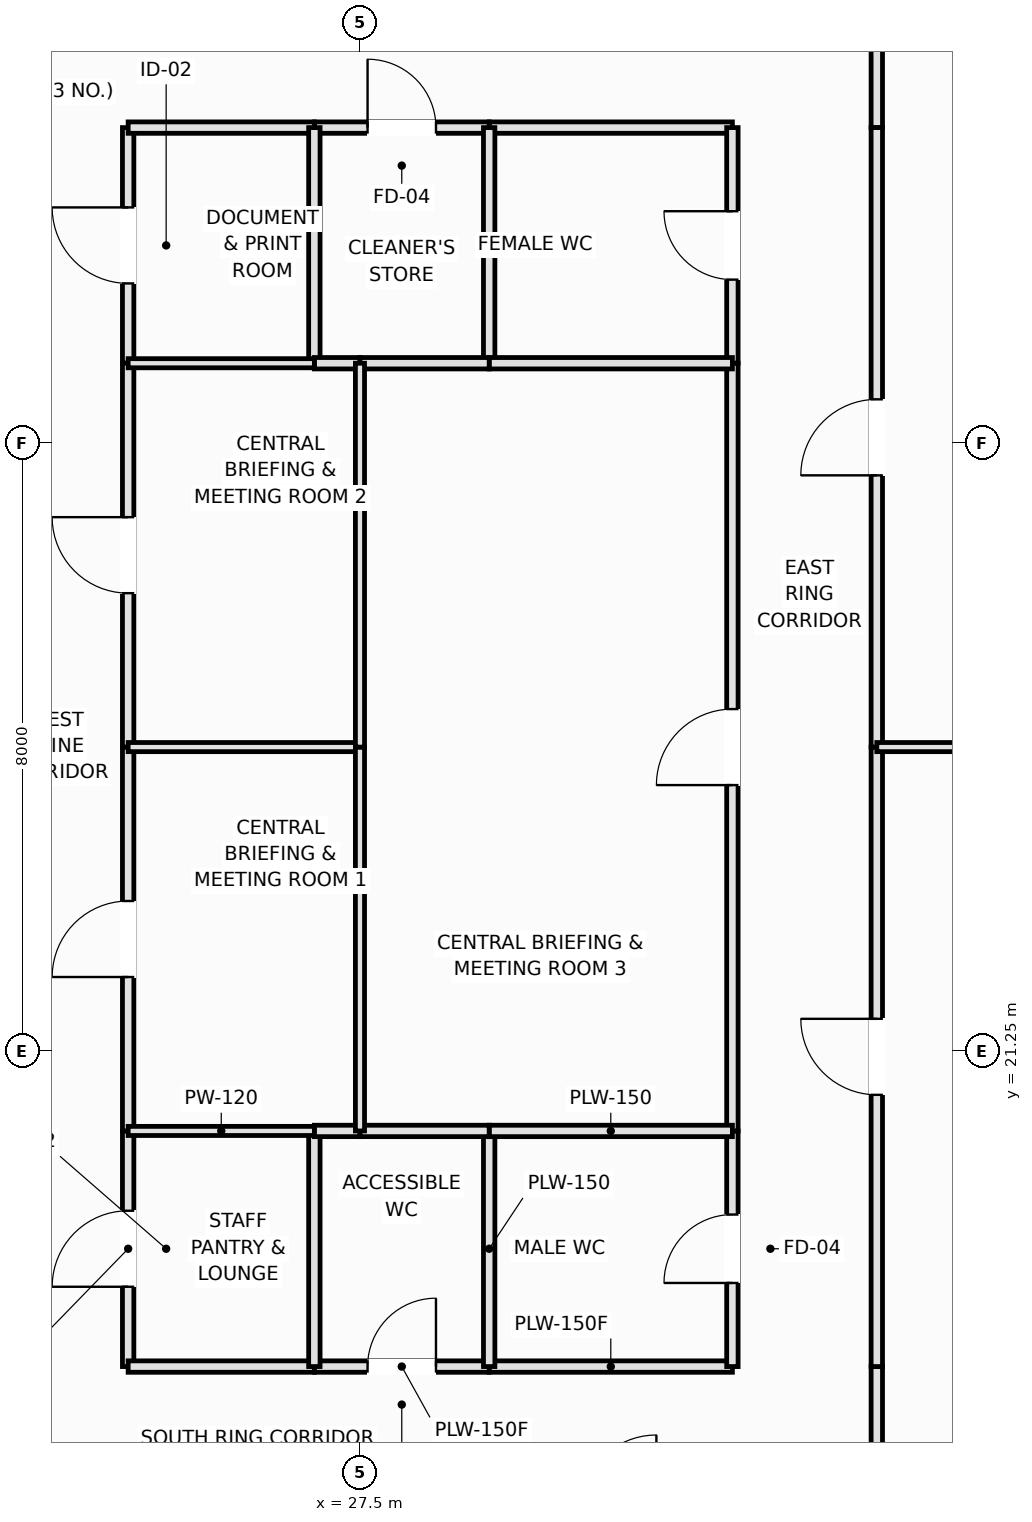
"""IFC4 building model, lengths in metres.
Left out: names, types, materials, properties, quantities, classifications, styles, units other than length and angle.
Written with IfcOpenShell. Run it as: python <this file> out.ifc"""

import sys

from ifc_helpers import new_model, si_unit, direction, frame, frame_2d, origin, place, context, subcontext, project, spatial, rectangle, extrude, element, fill, save


model = new_model("IFC4")
c1 = context("Model", 3, precision=1e-05, world=origin(), true_north=direction((0.0, 1.0)))
c2 = subcontext(c1, "Body", "Model", "MODEL_VIEW")
j1 = project(units=[si_unit("LENGTHUNIT", "METRE"), si_unit("PLANEANGLEUNIT", "RADIAN")], contexts=[c1])
p1 = place(None, origin())
s1 = spatial("IfcSite", under=j1, at=p1, CompositionType="ELEMENT")
p2 = place(p1, origin())
s2 = spatial("IfcBuilding", under=s1, at=p2, CompositionType="ELEMENT")
p3 = place(p2, frame((0.0, 0.0, 36.25)))
s3 = spatial("IfcBuildingStorey", under=s2, at=p3, CompositionType="ELEMENT", Elevation=36.25)
p4 = place(p3, frame((24.45, 17.1, 0.0), z_axis=(0.0, 0.0, 1.0), x_axis=(0.0, 1.0, 0.0)))
e1 = element("IfcWall", 1, at=p4, inside=s3, PredefinedType="PARTITIONING", context=c2, shape_type="SweptSolid", body=[
    extrude(rectangle(XDim=3.1, YDim=0.15, at=frame_2d((1.55, 0.0))), origin(), (0.0, 0.0, 1.0), 3.37),
])
p5 = place(p4, frame((1.05, 0.0, 0.0)))
e2 = element("IfcOpeningElement", 2, at=p5, cuts=e1, PredefinedType="OPENING", context=c2, shape_type="SweptSolid", body=[
    extrude(rectangle(XDim=1.0, YDim=2.15, at=frame_2d((0.5, 1.075))), frame((0.0, 0.085, 0.0), z_axis=(0.0, -1.0, 0.0), x_axis=(1.0, 0.0, 0.0)), (0.0, 0.0, 1.0), 0.17),
])
p6 = place(p3, frame((24.45, 30.3, 0.0), z_axis=(0.0, 0.0, 1.0), x_axis=(0.0, 1.0, 0.0)))
e3 = element("IfcWall", 3, at=p6, inside=s3, PredefinedType="PARTITIONING", context=c2, shape_type="SweptSolid", body=[
    extrude(rectangle(XDim=3.1, YDim=0.15, at=frame_2d((1.55, 0.0))), origin(), (0.0, 0.0, 1.0), 3.37),
])
p7 = place(p6, frame((1.05, 0.0, 0.0)))
e4 = element("IfcOpeningElement", 4, at=p7, cuts=e3, PredefinedType="OPENING", context=c2, shape_type="SweptSolid", body=[
    extrude(rectangle(XDim=1.0, YDim=2.15, at=frame_2d((0.5, 1.075))), frame((0.0, 0.085, 0.0), z_axis=(0.0, -1.0, 0.0), x_axis=(1.0, 0.0, 0.0)), (0.0, 0.0, 1.0), 0.17),
])
p8 = place(p3, frame((24.45, 20.2, 0.0), z_axis=(0.0, 0.0, 1.0), x_axis=(0.0, 1.0, 0.0)))
e5 = element("IfcWall", 5, at=p8, inside=s3, PredefinedType="PARTITIONING", context=c2, shape_type="SweptSolid", body=[
    extrude(rectangle(XDim=5.05, YDim=0.15, at=frame_2d((2.525, 0.0))), origin(), (0.0, 0.0, 1.0), 3.37),
])
p9 = place(p8, frame((2.025, 0.0, 0.0)))
e6 = element("IfcOpeningElement", 6, at=p9, cuts=e5, PredefinedType="OPENING", context=c2, shape_type="SweptSolid", body=[
    extrude(rectangle(XDim=1.0, YDim=2.15, at=frame_2d((0.5, 1.075))), frame((0.0, 0.085, 0.0), z_axis=(0.0, -1.0, 0.0), x_axis=(1.0, 0.0, 0.0)), (0.0, 0.0, 1.0), 0.17),
])
p10 = place(p3, frame((24.45, 25.25, 0.0), z_axis=(0.0, 0.0, 1.0), x_axis=(0.0, 1.0, 0.0)))
e7 = element("IfcWall", 7, at=p10, inside=s3, PredefinedType="PARTITIONING", context=c2, shape_type="SweptSolid", body=[
    extrude(rectangle(XDim=5.05, YDim=0.15, at=frame_2d((2.525, 0.0))), origin(), (0.0, 0.0, 1.0), 3.37),
])
p11 = place(p10, frame((2.025, 0.0, 0.0)))
e8 = element("IfcOpeningElement", 8, at=p11, cuts=e7, PredefinedType="OPENING", context=c2, shape_type="SweptSolid", body=[
    extrude(rectangle(XDim=1.0, YDim=2.15, at=frame_2d((0.5, 1.075))), frame((0.0, 0.085, 0.0), z_axis=(0.0, -1.0, 0.0), x_axis=(1.0, 0.0, 0.0)), (0.0, 0.0, 1.0), 0.17),
])
p12 = place(p3, frame((29.2, 17.1, 0.0), z_axis=(0.0, 0.0, 1.0), x_axis=(1.0, 0.0, 0.0)))
e9 = element("IfcWall", 9, at=p12, inside=s3, PredefinedType="PLUMBINGWALL", context=c2, shape_type="SweptSolid", body=[
    extrude(rectangle(XDim=3.2, YDim=0.15, at=frame_2d((1.6, 0.0))), origin(), (0.0, 0.0, 1.0), 3.37),
])
p13 = place(p3, frame((26.9, 17.1, 0.0), z_axis=(0.0, 0.0, 1.0), x_axis=(1.0, 0.0, 0.0)))
e10 = element("IfcWall", 10, at=p13, inside=s3, PredefinedType="PLUMBINGWALL", context=c2, shape_type="SweptSolid", body=[
    extrude(rectangle(XDim=2.3, YDim=0.15, at=frame_2d((1.15, 0.0))), origin(), (0.0, 0.0, 1.0), 3.37),
])
p14 = place(p13, frame((0.7, 0.0, 0.0)))
e11 = element("IfcOpeningElement", 11, at=p14, cuts=e10, PredefinedType="OPENING", context=c2, shape_type="SweptSolid", body=[
    extrude(rectangle(XDim=0.9, YDim=2.1, at=frame_2d((0.45, 1.05))), frame((0.0, 0.085, 0.0), z_axis=(0.0, -1.0, 0.0), x_axis=(1.0, 0.0, 0.0)), (0.0, 0.0, 1.0), 0.17),
])
p15 = place(p3, frame((24.45, 17.1, 0.0), z_axis=(0.0, 0.0, 1.0), x_axis=(1.0, 0.0, 0.0)))
e12 = element("IfcWall", 12, at=p15, inside=s3, PredefinedType="PARTITIONING", context=c2, shape_type="SweptSolid", body=[
    extrude(rectangle(XDim=2.45, YDim=0.15, at=frame_2d((1.225, 0.0))), origin(), (0.0, 0.0, 1.0), 3.37),
])
p16 = place(p3, frame((34.3, 15.2, 0.0), z_axis=(0.0, 0.0, 1.0), x_axis=(0.0, 1.0, 0.0)))
e13 = element("IfcWall", 13, at=p16, inside=s3, PredefinedType="PARTITIONING", context=c2, shape_type="SweptSolid", body=[
    extrude(rectangle(XDim=1.9, YDim=0.15, at=frame_2d((0.95, 0.0))), origin(), (0.0, 0.0, 1.0), 3.37),
])
p17 = place(p3, frame((29.2, 33.4, 0.0), z_axis=(0.0, 0.0, 1.0), x_axis=(1.0, 0.0, 0.0)))
e14 = element("IfcWall", 14, at=p17, inside=s3, PredefinedType="PLUMBINGWALL", context=c2, shape_type="SweptSolid", body=[
    extrude(rectangle(XDim=3.2, YDim=0.15, at=frame_2d((1.6, 0.0))), origin(), (0.0, 0.0, 1.0), 3.37),
])
p18 = place(p3, frame((26.9, 33.4, 0.0), z_axis=(0.0, 0.0, 1.0), x_axis=(1.0, 0.0, 0.0)))
e15 = element("IfcWall", 15, at=p18, inside=s3, PredefinedType="PLUMBINGWALL", context=c2, shape_type="SweptSolid", body=[
    extrude(rectangle(XDim=2.3, YDim=0.15, at=frame_2d((1.15, 0.0))), origin(), (0.0, 0.0, 1.0), 3.37),
])
p19 = place(p18, frame((0.7, 0.0, 0.0)))
e16 = element("IfcOpeningElement", 16, at=p19, cuts=e15, PredefinedType="OPENING", context=c2, shape_type="SweptSolid", body=[
    extrude(rectangle(XDim=0.9, YDim=2.1, at=frame_2d((0.45, 1.05))), frame((0.0, 0.085, 0.0), z_axis=(0.0, -1.0, 0.0), x_axis=(1.0, 0.0, 0.0)), (0.0, 0.0, 1.0), 0.17),
])
p20 = place(p3, frame((24.45, 33.4, 0.0), z_axis=(0.0, 0.0, 1.0), x_axis=(1.0, 0.0, 0.0)))
e17 = element("IfcWall", 17, at=p20, inside=s3, PredefinedType="PARTITIONING", context=c2, shape_type="SweptSolid", body=[
    extrude(rectangle(XDim=2.45, YDim=0.15, at=frame_2d((1.225, 0.0))), origin(), (0.0, 0.0, 1.0), 3.37),
])
p21 = place(p3, frame((34.3, 33.4, 0.0), z_axis=(0.0, 0.0, 1.0), x_axis=(0.0, 1.0, 0.0)))
e18 = element("IfcWall", 18, at=p21, inside=s3, PredefinedType="PARTITIONING", context=c2, shape_type="SweptSolid", body=[
    extrude(rectangle(XDim=1.9, YDim=0.15, at=frame_2d((0.95, 0.0))), origin(), (0.0, 0.0, 1.0), 3.37),
])
p22 = place(p3, frame((32.4, 17.1, 0.0), z_axis=(0.0, 0.0, 1.0), x_axis=(0.0, 1.0, 0.0)))
e19 = element("IfcWall", 19, at=p22, inside=s3, PredefinedType="PLUMBINGWALL", context=c2, shape_type="SweptSolid", body=[
    extrude(rectangle(XDim=3.1, YDim=0.15, at=frame_2d((1.55, 0.0))), origin(), (0.0, 0.0, 1.0), 3.37),
])
p23 = place(p22, frame((1.1, 0.0, 0.0)))
e20 = element("IfcOpeningElement", 20, at=p23, cuts=e19, PredefinedType="OPENING", context=c2, shape_type="SweptSolid", body=[
    extrude(rectangle(XDim=0.9, YDim=2.1, at=frame_2d((0.45, 1.05))), frame((0.0, 0.085, 0.0), z_axis=(0.0, -1.0, 0.0), x_axis=(1.0, 0.0, 0.0)), (0.0, 0.0, 1.0), 0.17),
])
p24 = place(p3, frame((32.4, 30.3, 0.0), z_axis=(0.0, 0.0, 1.0), x_axis=(0.0, 1.0, 0.0)))
e21 = element("IfcWall", 21, at=p24, inside=s3, PredefinedType="PLUMBINGWALL", context=c2, shape_type="SweptSolid", body=[
    extrude(rectangle(XDim=3.1, YDim=0.15, at=frame_2d((1.55, 0.0))), origin(), (0.0, 0.0, 1.0), 3.37),
])
p25 = place(p24, frame((1.1, 0.0, 0.0)))
e22 = element("IfcOpeningElement", 22, at=p25, cuts=e21, PredefinedType="OPENING", context=c2, shape_type="SweptSolid", body=[
    extrude(rectangle(XDim=0.9, YDim=2.1, at=frame_2d((0.45, 1.05))), frame((0.0, 0.085, 0.0), z_axis=(0.0, -1.0, 0.0), x_axis=(1.0, 0.0, 0.0)), (0.0, 0.0, 1.0), 0.17),
])
p26 = place(p3, frame((32.4, 20.2, 0.0), z_axis=(0.0, 0.0, 1.0), x_axis=(0.0, 1.0, 0.0)))
e23 = element("IfcWall", 23, at=p26, inside=s3, PredefinedType="PARTITIONING", context=c2, shape_type="SweptSolid", body=[
    extrude(rectangle(XDim=10.1, YDim=0.15, at=frame_2d((5.05, 0.0))), origin(), (0.0, 0.0, 1.0), 3.37),
])
p27 = place(p26, frame((4.55, 0.0, 0.0)))
e24 = element("IfcOpeningElement", 24, at=p27, cuts=e23, PredefinedType="OPENING", context=c2, shape_type="SweptSolid", body=[
    extrude(rectangle(XDim=1.0, YDim=2.15, at=frame_2d((0.5, 1.075))), frame((0.0, 0.085, 0.0), z_axis=(0.0, -1.0, 0.0), x_axis=(1.0, 0.0, 0.0)), (0.0, 0.0, 1.0), 0.17),
])
p28 = place(p3, frame((34.3, 17.1, 0.0), z_axis=(0.0, 0.0, 1.0), x_axis=(0.0, 1.0, 0.0)))
e25 = element("IfcWall", 25, at=p28, inside=s3, PredefinedType="PARTITIONING", context=c2, shape_type="SweptSolid", body=[
    extrude(rectangle(XDim=8.15, YDim=0.15, at=frame_2d((4.075, 0.0))), origin(), (0.0, 0.0, 1.0), 3.37),
])
p29 = place(p28, frame((3.575, 0.0, 0.0)))
e26 = element("IfcOpeningElement", 26, at=p29, cuts=e25, PredefinedType="OPENING", context=c2, shape_type="SweptSolid", body=[
    extrude(rectangle(XDim=1.0, YDim=2.15, at=frame_2d((0.5, 1.075))), frame((0.0, 0.085, 0.0), z_axis=(0.0, -1.0, 0.0), x_axis=(1.0, 0.0, 0.0)), (0.0, 0.0, 1.0), 0.17),
])
p30 = place(p3, frame((34.3, 25.25, 0.0), z_axis=(0.0, 0.0, 1.0), x_axis=(0.0, 1.0, 0.0)))
e27 = element("IfcWall", 27, at=p30, inside=s3, PredefinedType="PARTITIONING", context=c2, shape_type="SweptSolid", body=[
    extrude(rectangle(XDim=8.15, YDim=0.15, at=frame_2d((4.075, 0.0))), origin(), (0.0, 0.0, 1.0), 3.37),
])
p31 = place(p30, frame((3.575, 0.0, 0.0)))
e28 = element("IfcOpeningElement", 28, at=p31, cuts=e27, PredefinedType="OPENING", context=c2, shape_type="SweptSolid", body=[
    extrude(rectangle(XDim=1.0, YDim=2.15, at=frame_2d((0.5, 1.075))), frame((0.0, 0.085, 0.0), z_axis=(0.0, -1.0, 0.0), x_axis=(1.0, 0.0, 0.0)), (0.0, 0.0, 1.0), 0.17),
])
p32 = place(p3, frame((29.2, 17.1, 0.0), z_axis=(0.0, 0.0, 1.0), x_axis=(0.0, 1.0, 0.0)))
e29 = element("IfcWall", 29, at=p32, inside=s3, PredefinedType="PLUMBINGWALL", context=c2, shape_type="SweptSolid", body=[
    extrude(rectangle(XDim=3.1, YDim=0.15, at=frame_2d((1.55, 0.0))), origin(), (0.0, 0.0, 1.0), 3.37),
])
p33 = place(p3, frame((29.2, 20.2, 0.0), z_axis=(0.0, 0.0, 1.0), x_axis=(1.0, 0.0, 0.0)))
e30 = element("IfcWall", 30, at=p33, inside=s3, PredefinedType="PLUMBINGWALL", context=c2, shape_type="SweptSolid", body=[
    extrude(rectangle(XDim=3.2, YDim=0.15, at=frame_2d((1.6, 0.0))), origin(), (0.0, 0.0, 1.0), 3.37),
])
p34 = place(p3, frame((29.2, 30.3, 0.0), z_axis=(0.0, 0.0, 1.0), x_axis=(0.0, 1.0, 0.0)))
e31 = element("IfcWall", 31, at=p34, inside=s3, PredefinedType="PLUMBINGWALL", context=c2, shape_type="SweptSolid", body=[
    extrude(rectangle(XDim=3.1, YDim=0.15, at=frame_2d((1.55, 0.0))), origin(), (0.0, 0.0, 1.0), 3.37),
])
p35 = place(p3, frame((29.2, 30.3, 0.0), z_axis=(0.0, 0.0, 1.0), x_axis=(1.0, 0.0, 0.0)))
e32 = element("IfcWall", 32, at=p35, inside=s3, PredefinedType="PLUMBINGWALL", context=c2, shape_type="SweptSolid", body=[
    extrude(rectangle(XDim=3.2, YDim=0.15, at=frame_2d((1.6, 0.0))), origin(), (0.0, 0.0, 1.0), 3.37),
])
p36 = place(p3, frame((26.9, 17.1, 0.0), z_axis=(0.0, 0.0, 1.0), x_axis=(0.0, 1.0, 0.0)))
e33 = element("IfcWall", 33, at=p36, inside=s3, PredefinedType="PLUMBINGWALL", context=c2, shape_type="SweptSolid", body=[
    extrude(rectangle(XDim=3.1, YDim=0.15, at=frame_2d((1.55, 0.0))), origin(), (0.0, 0.0, 1.0), 3.37),
])
p37 = place(p3, frame((26.9, 20.2, 0.0), z_axis=(0.0, 0.0, 1.0), x_axis=(1.0, 0.0, 0.0)))
e34 = element("IfcWall", 34, at=p37, inside=s3, PredefinedType="PLUMBINGWALL", context=c2, shape_type="SweptSolid", body=[
    extrude(rectangle(XDim=0.6, YDim=0.15, at=frame_2d((0.3, 0.0))), origin(), (0.0, 0.0, 1.0), 3.37),
])
p38 = place(p3, frame((27.5, 20.2, 0.0), z_axis=(0.0, 0.0, 1.0), x_axis=(1.0, 0.0, 0.0)))
e35 = element("IfcWall", 35, at=p38, inside=s3, PredefinedType="PLUMBINGWALL", context=c2, shape_type="SweptSolid", body=[
    extrude(rectangle(XDim=1.7, YDim=0.15, at=frame_2d((0.85, 0.0))), origin(), (0.0, 0.0, 1.0), 3.37),
])
p39 = place(p3, frame((26.9, 30.3, 0.0), z_axis=(0.0, 0.0, 1.0), x_axis=(0.0, 1.0, 0.0)))
e36 = element("IfcWall", 36, at=p39, inside=s3, PredefinedType="PLUMBINGWALL", context=c2, shape_type="SweptSolid", body=[
    extrude(rectangle(XDim=3.1, YDim=0.15, at=frame_2d((1.55, 0.0))), origin(), (0.0, 0.0, 1.0), 3.37),
])
p40 = place(p3, frame((26.9, 30.3, 0.0), z_axis=(0.0, 0.0, 1.0), x_axis=(1.0, 0.0, 0.0)))
e37 = element("IfcWall", 37, at=p40, inside=s3, PredefinedType="PLUMBINGWALL", context=c2, shape_type="SweptSolid", body=[
    extrude(rectangle(XDim=0.6, YDim=0.15, at=frame_2d((0.3, 0.0))), origin(), (0.0, 0.0, 1.0), 3.37),
])
p41 = place(p3, frame((27.5, 30.3, 0.0), z_axis=(0.0, 0.0, 1.0), x_axis=(1.0, 0.0, 0.0)))
e38 = element("IfcWall", 38, at=p41, inside=s3, PredefinedType="PLUMBINGWALL", context=c2, shape_type="SweptSolid", body=[
    extrude(rectangle(XDim=1.7, YDim=0.15, at=frame_2d((0.85, 0.0))), origin(), (0.0, 0.0, 1.0), 3.37),
])
for number, where, z_axis, x_axis in (
    (39, (24.45, 20.2, 0.0), (0.0, 0.0, 1.0), (1.0, 0.0, 0.0)),
    (40, (24.45, 30.3, 0.0), (0.0, 0.0, 1.0), (1.0, 0.0, 0.0)),
):
    element("IfcWall", number, at=place(p3, frame(where, z_axis=z_axis, x_axis=x_axis)), inside=s3, PredefinedType="PARTITIONING", context=c2, shape_type="SweptSolid", body=[
        extrude(rectangle(XDim=2.45, YDim=0.12, at=frame_2d((1.225, 0.0))), origin(), (0.0, 0.0, 1.0), 3.37),
    ])
p42 = place(p3, frame((24.45, 25.25, 0.0), z_axis=(0.0, 0.0, 1.0), x_axis=(1.0, 0.0, 0.0)))
e41 = element("IfcWall", 41, at=p42, inside=s3, PredefinedType="PARTITIONING", context=c2, shape_type="SweptSolid", body=[
    extrude(rectangle(XDim=3.05, YDim=0.12, at=frame_2d((1.525, 0.0))), origin(), (0.0, 0.0, 1.0), 2.72),
])
for number, where, z_axis, x_axis in (
    (42, (27.5, 20.2, 0.0), (0.0, 0.0, 1.0), (0.0, 1.0, 0.0)),
    (43, (27.5, 25.25, 0.0), (0.0, 0.0, 1.0), (0.0, 1.0, 0.0)),
):
    element("IfcWall", number, at=place(p3, frame(where, z_axis=z_axis, x_axis=x_axis)), inside=s3, PredefinedType="PARTITIONING", context=c2, shape_type="SweptSolid", body=[
        extrude(rectangle(XDim=5.05, YDim=0.12, at=frame_2d((2.525, 0.0))), origin(), (0.0, 0.0, 1.0), 3.37),
    ])
p43 = place(p3, frame((34.3, 25.25, 0.0), z_axis=(0.0, 0.0, 1.0), x_axis=(1.0, 0.0, 0.0)))
e44 = element("IfcWall", 44, at=p43, inside=s3, PredefinedType="PARTITIONING", context=c2, shape_type="SweptSolid", body=[
    extrude(rectangle(XDim=19.19, YDim=0.12, at=frame_2d((9.595, 0.0))), origin(), (0.0, 0.0, 1.0), 2.72),
])
p44 = place(p5, origin())
e45 = element("IfcDoor", 45, at=p44, inside=s3, OperationType="SINGLE_SWING_LEFT", PredefinedType="DOOR", context=c2, shape_type="SweptSolid", body=[
    extrude(rectangle(XDim=1.0, YDim=2.15, at=frame_2d((0.5, 1.075))), frame((0.0, 0.025, 0.0), z_axis=(0.0, -1.0, 0.0), x_axis=(1.0, 0.0, 0.0)), (0.0, 0.0, 1.0), 0.05),
])
fill(e2, e45)
p45 = place(p7, origin())
e46 = element("IfcDoor", 46, at=p45, inside=s3, OperationType="SINGLE_SWING_RIGHT", PredefinedType="DOOR", context=c2, shape_type="SweptSolid", body=[
    extrude(rectangle(XDim=1.0, YDim=2.15, at=frame_2d((0.5, 1.075))), frame((0.0, 0.025, 0.0), z_axis=(0.0, -1.0, 0.0), x_axis=(1.0, 0.0, 0.0)), (0.0, 0.0, 1.0), 0.05),
])
fill(e4, e46)
p46 = place(p9, origin())
e47 = element("IfcDoor", 47, at=p46, inside=s3, OperationType="SINGLE_SWING_LEFT", PredefinedType="DOOR", context=c2, shape_type="SweptSolid", body=[
    extrude(rectangle(XDim=1.0, YDim=2.15, at=frame_2d((0.5, 1.075))), frame((0.0, 0.025, 0.0), z_axis=(0.0, -1.0, 0.0), x_axis=(1.0, 0.0, 0.0)), (0.0, 0.0, 1.0), 0.05),
])
fill(e6, e47)
p47 = place(p11, origin())
e48 = element("IfcDoor", 48, at=p47, inside=s3, OperationType="SINGLE_SWING_RIGHT", PredefinedType="DOOR", context=c2, shape_type="SweptSolid", body=[
    extrude(rectangle(XDim=1.0, YDim=2.15, at=frame_2d((0.5, 1.075))), frame((0.0, 0.025, 0.0), z_axis=(0.0, -1.0, 0.0), x_axis=(1.0, 0.0, 0.0)), (0.0, 0.0, 1.0), 0.05),
])
fill(e8, e48)
p48 = place(p14, origin())
e49 = element("IfcDoor", 49, at=p48, inside=s3, OperationType="SINGLE_SWING_RIGHT", PredefinedType="DOOR", context=c2, shape_type="SweptSolid", body=[
    extrude(rectangle(XDim=0.9, YDim=2.1, at=frame_2d((0.45, 1.05))), frame((0.0, 0.025, 0.0), z_axis=(0.0, -1.0, 0.0), x_axis=(1.0, 0.0, 0.0)), (0.0, 0.0, 1.0), 0.05),
])
fill(e11, e49)
p49 = place(p19, origin())
e50 = element("IfcDoor", 50, at=p49, inside=s3, OperationType="SINGLE_SWING_LEFT", PredefinedType="DOOR", context=c2, shape_type="SweptSolid", body=[
    extrude(rectangle(XDim=0.9, YDim=2.1, at=frame_2d((0.45, 1.05))), frame((0.0, 0.025, 0.0), z_axis=(0.0, -1.0, 0.0), x_axis=(1.0, 0.0, 0.0)), (0.0, 0.0, 1.0), 0.05),
])
fill(e16, e50)
p50 = place(p23, origin())
e51 = element("IfcDoor", 51, at=p50, inside=s3, OperationType="SINGLE_SWING_LEFT", PredefinedType="DOOR", context=c2, shape_type="SweptSolid", body=[
    extrude(rectangle(XDim=0.9, YDim=2.1, at=frame_2d((0.45, 1.05))), frame((0.0, 0.025, 0.0), z_axis=(0.0, -1.0, 0.0), x_axis=(1.0, 0.0, 0.0)), (0.0, 0.0, 1.0), 0.05),
])
fill(e20, e51)
p51 = place(p25, origin())
e52 = element("IfcDoor", 52, at=p51, inside=s3, OperationType="SINGLE_SWING_RIGHT", PredefinedType="DOOR", context=c2, shape_type="SweptSolid", body=[
    extrude(rectangle(XDim=0.9, YDim=2.1, at=frame_2d((0.45, 1.05))), frame((0.0, 0.025, 0.0), z_axis=(0.0, -1.0, 0.0), x_axis=(1.0, 0.0, 0.0)), (0.0, 0.0, 1.0), 0.05),
])
fill(e22, e52)
p52 = place(p27, origin())
e53 = element("IfcDoor", 53, at=p52, inside=s3, OperationType="SINGLE_SWING_LEFT", PredefinedType="DOOR", context=c2, shape_type="SweptSolid", body=[
    extrude(rectangle(XDim=1.0, YDim=2.15, at=frame_2d((0.5, 1.075))), frame((0.0, 0.025, 0.0), z_axis=(0.0, -1.0, 0.0), x_axis=(1.0, 0.0, 0.0)), (0.0, 0.0, 1.0), 0.05),
])
fill(e24, e53)
p53 = place(p29, origin())
e54 = element("IfcDoor", 54, at=p53, inside=s3, OperationType="SINGLE_SWING_RIGHT", PredefinedType="DOOR", context=c2, shape_type="SweptSolid", body=[
    extrude(rectangle(XDim=1.0, YDim=2.15, at=frame_2d((0.5, 1.075))), frame((0.0, 0.025, 0.0), z_axis=(0.0, -1.0, 0.0), x_axis=(1.0, 0.0, 0.0)), (0.0, 0.0, 1.0), 0.05),
])
fill(e26, e54)
p54 = place(p31, origin())
e55 = element("IfcDoor", 55, at=p54, inside=s3, OperationType="SINGLE_SWING_LEFT", PredefinedType="DOOR", context=c2, shape_type="SweptSolid", body=[
    extrude(rectangle(XDim=1.0, YDim=2.15, at=frame_2d((0.5, 1.075))), frame((0.0, 0.025, 0.0), z_axis=(0.0, -1.0, 0.0), x_axis=(1.0, 0.0, 0.0)), (0.0, 0.0, 1.0), 0.05),
])
fill(e28, e55)
save(model, sys.argv[1])
